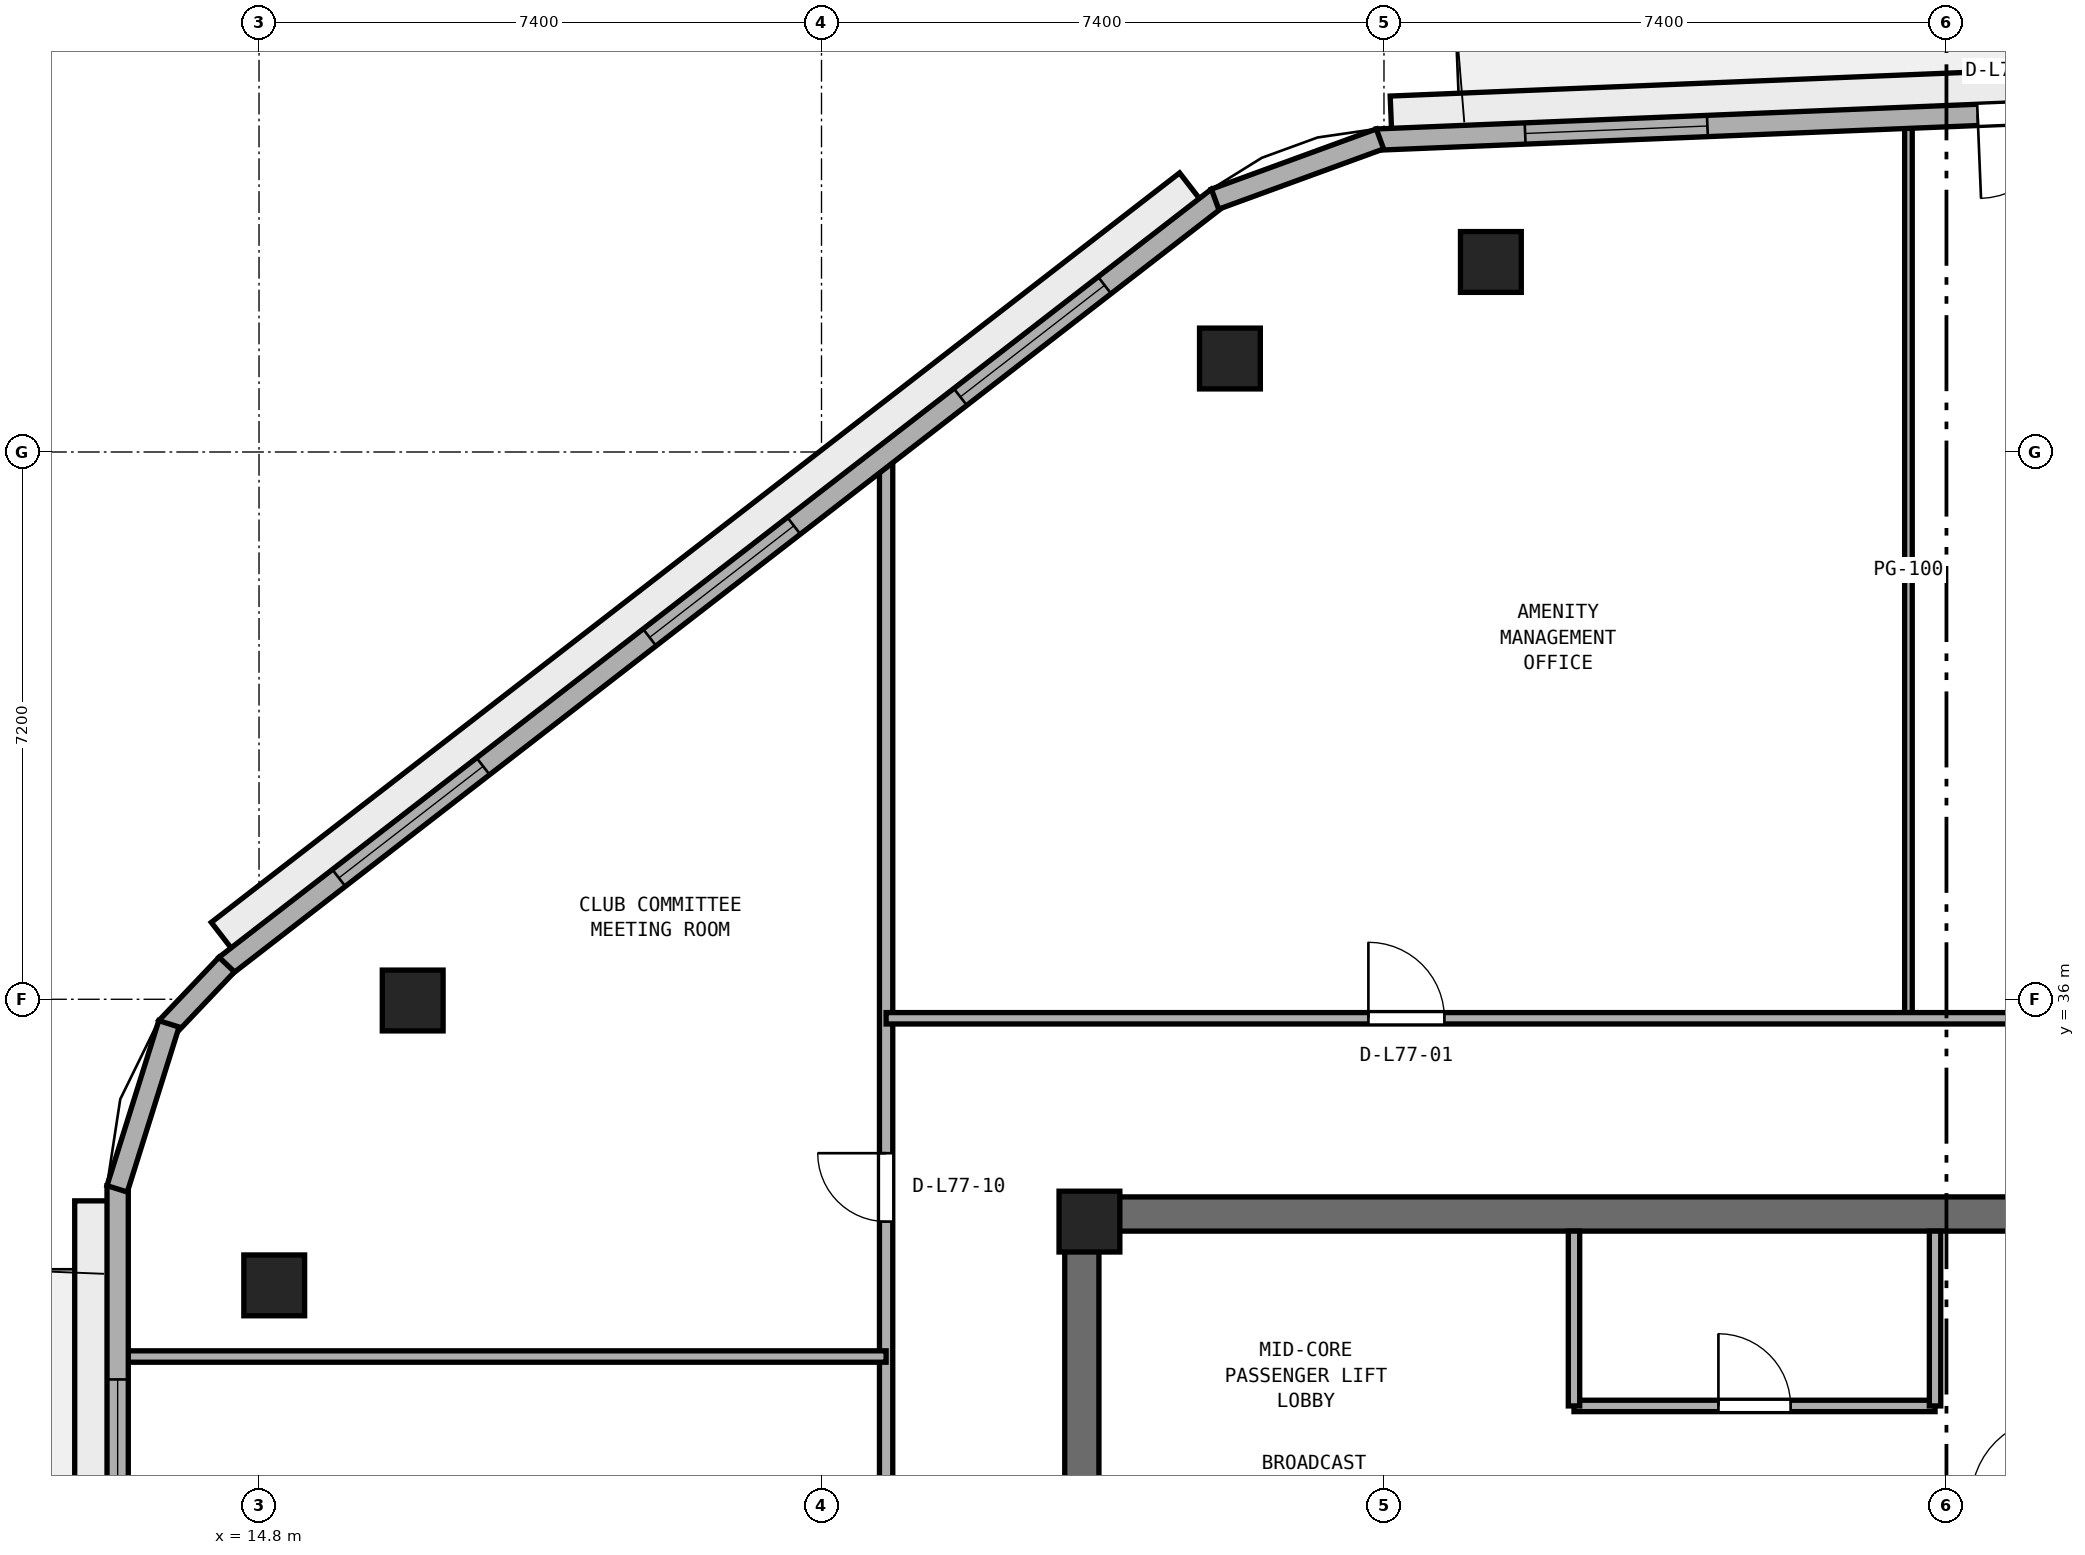
"""IFC4 building model, lengths in metres.
Left out: names, types, materials, properties, quantities, classifications, styles, units other than length and angle.
Written with IfcOpenShell. Run it as: python <this file> out.ifc"""

import sys

from ifc_helpers import new_model, si_unit, direction, frame, frame_2d, origin, origin_2d, place, context, subcontext, project, spatial, rectangle, extrude, element, fill, save


model = new_model("IFC4")
c1 = context("Model", 3, precision=1e-05, world=origin(), true_north=direction((0.0, 1.0)))
c2 = subcontext(c1, "Body", "Model", "MODEL_VIEW")
j1 = project(units=[si_unit("LENGTHUNIT", "METRE"), si_unit("PLANEANGLEUNIT", "RADIAN")], contexts=[c1])
p1 = place(None, origin())
s1 = spatial("IfcSite", under=j1, at=p1, CompositionType="ELEMENT")
p2 = place(p1, origin())
s2 = spatial("IfcBuilding", under=s1, at=p2, CompositionType="ELEMENT")
p3 = place(p2, frame((0.0, 0.0, 301.0)))
s3 = spatial("IfcBuildingStorey", under=s2, at=p3, CompositionType="ELEMENT", Elevation=301.0)
p4 = place(p3, frame((25.4, 33.175, 0.0), z_axis=(0.0, 0.0, 1.0), x_axis=(1.0, 0.0, 0.0)))
e1 = element("IfcWall", 1, at=p4, inside=s3, PredefinedType="SHEAR", context=c2, shape_type="SweptSolid", body=[
    extrude(rectangle(XDim=23.2, YDim=0.45, at=frame_2d((11.6, 0.0))), origin(), (0.0, 0.0, 1.0), 3.54),
])
p5 = place(p3, frame((25.625, 17.45, 0.0), z_axis=(0.0, 0.0, 1.0), x_axis=(0.0, 1.0, 0.0)))
e2 = element("IfcWall", 2, at=p5, inside=s3, PredefinedType="SHEAR", context=c2, shape_type="SweptSolid", body=[
    extrude(rectangle(XDim=15.5, YDim=0.45, at=frame_2d((7.75, 0.0))), origin(), (0.0, 0.0, 1.0), 3.54),
])
p6 = place(p5, frame((7.0, 0.0, 0.0)))
e3 = element("IfcOpeningElement", 3, at=p6, cuts=e2, PredefinedType="OPENING", context=c2, shape_type="SweptSolid", body=[
    extrude(rectangle(XDim=1.5, YDim=2.15, at=frame_2d((0.75, 1.075))), frame((0.0, 0.235, 0.0), z_axis=(0.0, -1.0, 0.0), x_axis=(1.0, 0.0, 0.0)), (0.0, 0.0, 1.0), 0.47),
])
p7 = place(p3, frame((25.725, 33.075, 0.0), z_axis=(0.0, 0.0, 1.0), x_axis=(1.0, 0.0, 0.0)))
e4 = element("IfcColumn", 4, at=p7, inside=s3, PredefinedType="PILASTER", context=c2, shape_type="SweptSolid", body=[
    extrude(rectangle(XDim=0.8, YDim=0.8, at=origin_2d()), origin(), (0.0, 0.0, 1.0), 3.8),
])
for number, where, z_axis, x_axis in (
    (5, (31.007, 45.7, 0.0), (0.0, 0.0, 1.0), (1.0, 0.0, 0.0)),
    (6, (27.573, 44.43, 0.0), (0.0, 0.0, 1.0), (1.0, 0.0, 0.0)),
    (7, (16.822, 35.984, 0.0), (0.0, 0.0, 1.0), (1.0, 0.0, 0.0)),
    (8, (15.0, 32.236, 0.0), (0.0, 0.0, 1.0), (1.0, 0.0, 0.0)),
):
    element("IfcColumn", number, at=place(p3, frame(where, z_axis=z_axis, x_axis=x_axis)), inside=s3, PredefinedType="COLUMN", context=c2, shape_type="SweptSolid", body=[
        extrude(rectangle(XDim=0.8, YDim=0.8, at=origin_2d()), origin(), (0.0, 0.0, 1.0), 3.8),
    ])
p8 = place(p3, frame((32.1, 30.65, 0.0), z_axis=(0.0, 0.0, 1.0), x_axis=(1.0, 0.0, 0.0)))
e9 = element("IfcWall", 9, at=p8, inside=s3, PredefinedType="PARTITIONING", context=c2, shape_type="SweptSolid", body=[
    extrude(rectangle(XDim=4.75, YDim=0.15, at=frame_2d((2.375, 0.0))), origin(), (0.0, 0.0, 1.0), 3.54),
])
p9 = place(p8, frame((1.9, 0.0, 0.0)))
e10 = element("IfcOpeningElement", 10, at=p9, cuts=e9, PredefinedType="OPENING", context=c2, shape_type="SweptSolid", body=[
    extrude(rectangle(XDim=0.95, YDim=2.1, at=frame_2d((0.475, 1.05))), frame((0.0, 0.085, 0.0), z_axis=(0.0, -1.0, 0.0), x_axis=(1.0, 0.0, 0.0)), (0.0, 0.0, 1.0), 0.17),
])
for number, where, z_axis, x_axis in (
    (11, (32.1, 30.65, 0.0), (0.0, 0.0, 1.0), (0.0, 1.0, 0.0)),
    (12, (36.85, 30.65, 0.0), (0.0, 0.0, 1.0), (0.0, 1.0, 0.0)),
):
    element("IfcWall", number, at=place(p3, frame(where, z_axis=z_axis, x_axis=x_axis)), inside=s3, PredefinedType="PARTITIONING", context=c2, shape_type="SweptSolid", body=[
        extrude(rectangle(XDim=2.3, YDim=0.15, at=frame_2d((1.15, 0.0))), origin(), (0.0, 0.0, 1.0), 3.54),
    ])
p10 = place(p3, frame((36.5, 35.75, 0.0), z_axis=(0.0, 0.0, 1.0), x_axis=(0.0, 1.0, 0.0)))
e13 = element("IfcWall", 13, at=p10, inside=s3, PredefinedType="PARTITIONING", context=c2, shape_type="SweptSolid", body=[
    extrude(rectangle(XDim=11.783, YDim=0.1, at=frame_2d((5.891, 0.0))), origin(), (0.0, 0.0, 1.0), 3.54),
])
p11 = place(p3, frame((23.05, 6.894, 0.0), z_axis=(0.0, 0.0, 1.0), x_axis=(0.0, 1.0, 0.0)))
e14 = element("IfcWall", 14, at=p11, inside=s3, PredefinedType="PARTITIONING", context=c2, shape_type="SweptSolid", body=[
    extrude(rectangle(XDim=36.312, YDim=0.175, at=frame_2d((18.156, 0.0))), origin(), (0.0, 0.0, 1.0), 3.54),
])
p12 = place(p11, frame((9.031, 0.0, 0.0)))
e15 = element("IfcOpeningElement", 15, at=p12, cuts=e14, PredefinedType="OPENING", context=c2, shape_type="SweptSolid", body=[
    extrude(rectangle(XDim=0.9, YDim=2.1, at=frame_2d((0.45, 1.05))), frame((0.0, 0.097, 0.0), z_axis=(0.0, -1.0, 0.0), x_axis=(1.0, 0.0, 0.0)), (0.0, 0.0, 1.0), 0.195),
])
p13 = place(p11, frame((14.056, 0.0, 0.0)))
e16 = element("IfcOpeningElement", 16, at=p13, cuts=e14, PredefinedType="OPENING", context=c2, shape_type="SweptSolid", body=[
    extrude(rectangle(XDim=0.9, YDim=2.1, at=frame_2d((0.45, 1.05))), frame((0.0, 0.097, 0.0), z_axis=(0.0, -1.0, 0.0), x_axis=(1.0, 0.0, 0.0)), (0.0, 0.0, 1.0), 0.195),
])
p14 = place(p11, frame((20.606, 0.0, 0.0)))
e17 = element("IfcOpeningElement", 17, at=p14, cuts=e14, PredefinedType="OPENING", context=c2, shape_type="SweptSolid", body=[
    extrude(rectangle(XDim=1.0, YDim=2.12, at=frame_2d((0.5, 1.06))), frame((0.0, 0.097, 0.0), z_axis=(0.0, -1.0, 0.0), x_axis=(1.0, 0.0, 0.0)), (0.0, 0.0, 1.0), 0.195),
])
p15 = place(p11, frame((26.181, 0.0, 0.0)))
e18 = element("IfcOpeningElement", 18, at=p15, cuts=e14, PredefinedType="OPENING", context=c2, shape_type="SweptSolid", body=[
    extrude(rectangle(XDim=0.9, YDim=2.1, at=frame_2d((0.45, 1.05))), frame((0.0, 0.097, 0.0), z_axis=(0.0, -1.0, 0.0), x_axis=(1.0, 0.0, 0.0)), (0.0, 0.0, 1.0), 0.195),
])
p16 = place(p3, frame((13.005, 31.3, 0.0), z_axis=(0.0, 0.0, 1.0), x_axis=(1.0, 0.0, 0.0)))
e19 = element("IfcWall", 19, at=p16, inside=s3, PredefinedType="PARTITIONING", context=c2, shape_type="SweptSolid", body=[
    extrude(rectangle(XDim=10.045, YDim=0.15, at=frame_2d((5.022, 0.0))), origin(), (0.0, 0.0, 1.0), 3.54),
])
p17 = place(p3, frame((23.05, 35.75, 0.0), z_axis=(0.0, 0.0, 1.0), x_axis=(1.0, 0.0, 0.0)))
e20 = element("IfcWall", 20, at=p17, inside=s3, PredefinedType="PARTITIONING", context=c2, shape_type="SweptSolid", body=[
    extrude(rectangle(XDim=25.55, YDim=0.15, at=frame_2d((12.775, 0.0))), origin(), (0.0, 0.0, 1.0), 3.54),
])
p18 = place(p17, frame((6.345, 0.0, 0.0)))
e21 = element("IfcOpeningElement", 21, at=p18, cuts=e20, PredefinedType="OPENING", context=c2, shape_type="SweptSolid", body=[
    extrude(rectangle(XDim=1.0, YDim=2.12, at=frame_2d((0.5, 1.06))), frame((0.0, 0.085, 0.0), z_axis=(0.0, -1.0, 0.0), x_axis=(1.0, 0.0, 0.0)), (0.0, 0.0, 1.0), 0.17),
])
p19 = place(p17, frame((18.93, 0.0, 0.0)))
e22 = element("IfcOpeningElement", 22, at=p19, cuts=e20, PredefinedType="OPENING", context=c2, shape_type="SweptSolid", body=[
    extrude(rectangle(XDim=0.9, YDim=2.1, at=frame_2d((0.45, 1.05))), frame((0.0, 0.085, 0.0), z_axis=(0.0, -1.0, 0.0), x_axis=(1.0, 0.0, 0.0)), (0.0, 0.0, 1.0), 0.17),
])
p20 = place(p3, frame((46.414, 48.005, 0.0), z_axis=(0.0, 0.0, 1.0), x_axis=(-0.999156194126, -0.041071885021, 0.0)))
e23 = element("IfcWall", 23, at=p20, inside=s3, PredefinedType="STANDARD", context=c2, shape_type="SweptSolid", body=[
    extrude(rectangle(XDim=16.923, YDim=0.28, at=frame_2d((8.461, 0.0))), origin(), (0.0, 0.0, 1.0), 3.54),
])
p21 = place(p20, frame((7.912, 0.0, 0.0)))
e24 = element("IfcOpeningElement", 24, at=p21, cuts=e23, PredefinedType="OPENING", context=c2, shape_type="SweptSolid", body=[
    extrude(rectangle(XDim=1.1, YDim=2.2, at=frame_2d((0.55, 1.1))), frame((0.0, 0.15, 0.0), z_axis=(0.0, -1.0, 0.0), x_axis=(1.0, 0.0, 0.0)), (0.0, 0.0, 1.0), 0.3),
])
p22 = place(p20, frame((1.954, 0.0, 0.9)))
e25 = element("IfcOpeningElement", 25, at=p22, cuts=e23, PredefinedType="OPENING", context=c2, shape_type="SweptSolid", body=[
    extrude(rectangle(XDim=2.4, YDim=1.75, at=frame_2d((1.2, 0.875))), frame((0.0, 0.15, 0.0), z_axis=(0.0, -1.0, 0.0), x_axis=(1.0, 0.0, 0.0)), (0.0, 0.0, 1.0), 0.3),
])
p23 = place(p20, frame((12.569, 0.0, 0.9)))
e26 = element("IfcOpeningElement", 26, at=p23, cuts=e23, PredefinedType="OPENING", context=c2, shape_type="SweptSolid", body=[
    extrude(rectangle(XDim=2.4, YDim=1.75, at=frame_2d((1.2, 0.875))), frame((0.0, 0.15, 0.0), z_axis=(0.0, -1.0, 0.0), x_axis=(1.0, 0.0, 0.0)), (0.0, 0.0, 1.0), 0.3),
])
p24 = place(p3, frame((27.415, 46.547, 0.0), z_axis=(0.0, 0.0, 1.0), x_axis=(-0.790789745248, -0.612087884875, 0.0)))
e27 = element("IfcWall", 27, at=p24, inside=s3, PredefinedType="STANDARD", context=c2, shape_type="SweptSolid", body=[
    extrude(rectangle(XDim=16.509, YDim=0.28, at=frame_2d((8.254, 0.0))), origin(), (0.0, 0.0, 1.0), 3.54),
])
p25 = place(p24, frame((1.885, 0.0, 0.9)))
e28 = element("IfcOpeningElement", 28, at=p25, cuts=e27, PredefinedType="OPENING", context=c2, shape_type="SweptSolid", body=[
    extrude(rectangle(XDim=2.4, YDim=1.75, at=frame_2d((1.2, 0.875))), frame((0.0, 0.15, 0.0), z_axis=(0.0, -1.0, 0.0), x_axis=(1.0, 0.0, 0.0)), (0.0, 0.0, 1.0), 0.3),
])
p26 = place(p24, frame((7.055, 0.0, 0.9)))
e29 = element("IfcOpeningElement", 29, at=p26, cuts=e27, PredefinedType="OPENING", context=c2, shape_type="SweptSolid", body=[
    extrude(rectangle(XDim=2.4, YDim=1.75, at=frame_2d((1.2, 0.875))), frame((0.0, 0.15, 0.0), z_axis=(0.0, -1.0, 0.0), x_axis=(1.0, 0.0, 0.0)), (0.0, 0.0, 1.0), 0.3),
])
p27 = place(p24, frame((12.224, 0.0, 0.9)))
e30 = element("IfcOpeningElement", 30, at=p27, cuts=e27, PredefinedType="OPENING", context=c2, shape_type="SweptSolid", body=[
    extrude(rectangle(XDim=2.4, YDim=1.75, at=frame_2d((1.2, 0.875))), frame((0.0, 0.15, 0.0), z_axis=(0.0, -1.0, 0.0), x_axis=(1.0, 0.0, 0.0)), (0.0, 0.0, 1.0), 0.3),
])
p28 = place(p3, frame((12.94, 33.548, 0.0), z_axis=(0.0, 0.0, 1.0), x_axis=(0.0, -1.0, 0.0)))
e31 = element("IfcWall", 31, at=p28, inside=s3, PredefinedType="STANDARD", context=c2, shape_type="SweptSolid", body=[
    extrude(rectangle(XDim=17.496, YDim=0.28, at=frame_2d((8.748, 0.0))), origin(), (0.0, 0.0, 1.0), 3.54),
])
p29 = place(p28, frame((9.198, 0.0, 0.0)))
e32 = element("IfcOpeningElement", 32, at=p29, cuts=e31, PredefinedType="OPENING", context=c2, shape_type="SweptSolid", body=[
    extrude(rectangle(XDim=1.1, YDim=2.2, at=frame_2d((0.55, 1.1))), frame((0.0, 0.15, 0.0), z_axis=(0.0, -1.0, 0.0), x_axis=(1.0, 0.0, 0.0)), (0.0, 0.0, 1.0), 0.3),
])
p30 = place(p28, frame((2.549, 0.0, 0.9)))
e33 = element("IfcOpeningElement", 33, at=p30, cuts=e31, PredefinedType="OPENING", context=c2, shape_type="SweptSolid", body=[
    extrude(rectangle(XDim=2.4, YDim=1.75, at=frame_2d((1.2, 0.875))), frame((0.0, 0.15, 0.0), z_axis=(0.0, -1.0, 0.0), x_axis=(1.0, 0.0, 0.0)), (0.0, 0.0, 1.0), 0.3),
])
p31 = place(p28, frame((12.547, 0.0, 0.9)))
e34 = element("IfcOpeningElement", 34, at=p31, cuts=e31, PredefinedType="OPENING", context=c2, shape_type="SweptSolid", body=[
    extrude(rectangle(XDim=2.4, YDim=1.75, at=frame_2d((1.2, 0.875))), frame((0.0, 0.15, 0.0), z_axis=(0.0, -1.0, 0.0), x_axis=(1.0, 0.0, 0.0)), (0.0, 0.0, 1.0), 0.3),
])
p32 = place(p3, frame((29.547, 47.318, 0.0), z_axis=(0.0, 0.0, 1.0), x_axis=(-0.93940703724, -0.342803760748, 0.0)))
e35 = element("IfcWall", 35, at=p32, inside=s3, PredefinedType="STANDARD", context=c2, shape_type="SweptSolid", body=[
    extrude(rectangle(XDim=2.31, YDim=0.28, at=frame_2d((1.155, 0.0))), origin(), (0.0, 0.0, 1.0), 3.54),
])
p33 = place(p3, frame((14.375, 36.457, 0.0), z_axis=(0.0, 0.0, 1.0), x_axis=(-0.68895569752, -0.724803453948, 0.0)))
e36 = element("IfcWall", 36, at=p33, inside=s3, PredefinedType="STANDARD", context=c2, shape_type="SweptSolid", body=[
    extrude(rectangle(XDim=1.151, YDim=0.28, at=frame_2d((0.575, 0.0))), origin(), (0.0, 0.0, 1.0), 3.54),
])
p34 = place(p3, frame((13.615, 35.677, 0.0), z_axis=(0.0, 0.0, 1.0), x_axis=(-0.299374552426, -0.954135670311, 0.0)))
e37 = element("IfcWall", 37, at=p34, inside=s3, PredefinedType="STANDARD", context=c2, shape_type="SweptSolid", body=[
    extrude(rectangle(XDim=2.275, YDim=0.28, at=frame_2d((1.138, 0.0))), origin(), (0.0, 0.0, 1.0), 3.54),
])
p35 = place(p9, origin())
e38 = element("IfcDoor", 38, at=p35, inside=s3, OperationType="SINGLE_SWING_LEFT", PredefinedType="DOOR", context=c2, shape_type="SweptSolid", body=[
    extrude(rectangle(XDim=0.95, YDim=2.1, at=frame_2d((0.475, 1.05))), frame((0.0, 0.025, 0.0), z_axis=(0.0, -1.0, 0.0), x_axis=(1.0, 0.0, 0.0)), (0.0, 0.0, 1.0), 0.05),
])
fill(e10, e38)
p36 = place(p18, origin())
e39 = element("IfcDoor", 39, at=p36, inside=s3, OperationType="SINGLE_SWING_LEFT", PredefinedType="DOOR", context=c2, shape_type="SweptSolid", body=[
    extrude(rectangle(XDim=1.0, YDim=2.12, at=frame_2d((0.5, 1.06))), frame((0.0, 0.025, 0.0), z_axis=(0.0, -1.0, 0.0), x_axis=(1.0, 0.0, 0.0)), (0.0, 0.0, 1.0), 0.05),
])
fill(e21, e39)
p37 = place(p15, origin())
e40 = element("IfcDoor", 40, at=p37, inside=s3, OperationType="SINGLE_SWING_RIGHT", PredefinedType="DOOR", context=c2, shape_type="SweptSolid", body=[
    extrude(rectangle(XDim=0.9, YDim=2.1, at=frame_2d((0.45, 1.05))), frame((0.0, 0.025, 0.0), z_axis=(0.0, -1.0, 0.0), x_axis=(1.0, 0.0, 0.0)), (0.0, 0.0, 1.0), 0.05),
])
fill(e18, e40)
p38 = place(p21, origin())
e41 = element("IfcDoor", 41, at=p38, inside=s3, OperationType="SINGLE_SWING_RIGHT", PredefinedType="DOOR", context=c2, shape_type="SweptSolid", body=[
    extrude(rectangle(XDim=1.1, YDim=2.2, at=frame_2d((0.55, 1.1))), frame((0.0, 0.025, 0.0), z_axis=(0.0, -1.0, 0.0), x_axis=(1.0, 0.0, 0.0)), (0.0, 0.0, 1.0), 0.05),
])
fill(e24, e41)
p39 = place(p23, origin())
e42 = element("IfcWindow", 42, at=p39, inside=s3, PartitioningType="SINGLE_PANEL", PredefinedType="WINDOW", context=c2, shape_type="SweptSolid", body=[
    extrude(rectangle(XDim=2.4, YDim=1.75, at=frame_2d((1.2, 0.875))), frame((0.0, 0.03, 0.0), z_axis=(0.0, -1.0, 0.0), x_axis=(1.0, 0.0, 0.0)), (0.0, 0.0, 1.0), 0.06),
])
fill(e26, e42)
p40 = place(p25, origin())
e43 = element("IfcWindow", 43, at=p40, inside=s3, PartitioningType="SINGLE_PANEL", PredefinedType="WINDOW", context=c2, shape_type="SweptSolid", body=[
    extrude(rectangle(XDim=2.4, YDim=1.75, at=frame_2d((1.2, 0.875))), frame((0.0, 0.03, 0.0), z_axis=(0.0, -1.0, 0.0), x_axis=(1.0, 0.0, 0.0)), (0.0, 0.0, 1.0), 0.06),
])
fill(e28, e43)
p41 = place(p26, origin())
e44 = element("IfcWindow", 44, at=p41, inside=s3, PartitioningType="SINGLE_PANEL", PredefinedType="WINDOW", context=c2, shape_type="SweptSolid", body=[
    extrude(rectangle(XDim=2.4, YDim=1.75, at=frame_2d((1.2, 0.875))), frame((0.0, 0.03, 0.0), z_axis=(0.0, -1.0, 0.0), x_axis=(1.0, 0.0, 0.0)), (0.0, 0.0, 1.0), 0.06),
])
fill(e29, e44)
p42 = place(p27, origin())
e45 = element("IfcWindow", 45, at=p42, inside=s3, PartitioningType="SINGLE_PANEL", PredefinedType="WINDOW", context=c2, shape_type="SweptSolid", body=[
    extrude(rectangle(XDim=2.4, YDim=1.75, at=frame_2d((1.2, 0.875))), frame((0.0, 0.03, 0.0), z_axis=(0.0, -1.0, 0.0), x_axis=(1.0, 0.0, 0.0)), (0.0, 0.0, 1.0), 0.06),
])
fill(e30, e45)
p43 = place(p30, origin())
e46 = element("IfcWindow", 46, at=p43, inside=s3, PartitioningType="SINGLE_PANEL", PredefinedType="WINDOW", context=c2, shape_type="SweptSolid", body=[
    extrude(rectangle(XDim=2.4, YDim=1.75, at=frame_2d((1.2, 0.875))), frame((0.0, 0.03, 0.0), z_axis=(0.0, -1.0, 0.0), x_axis=(1.0, 0.0, 0.0)), (0.0, 0.0, 1.0), 0.06),
])
fill(e33, e46)
save(model, sys.argv[1])
